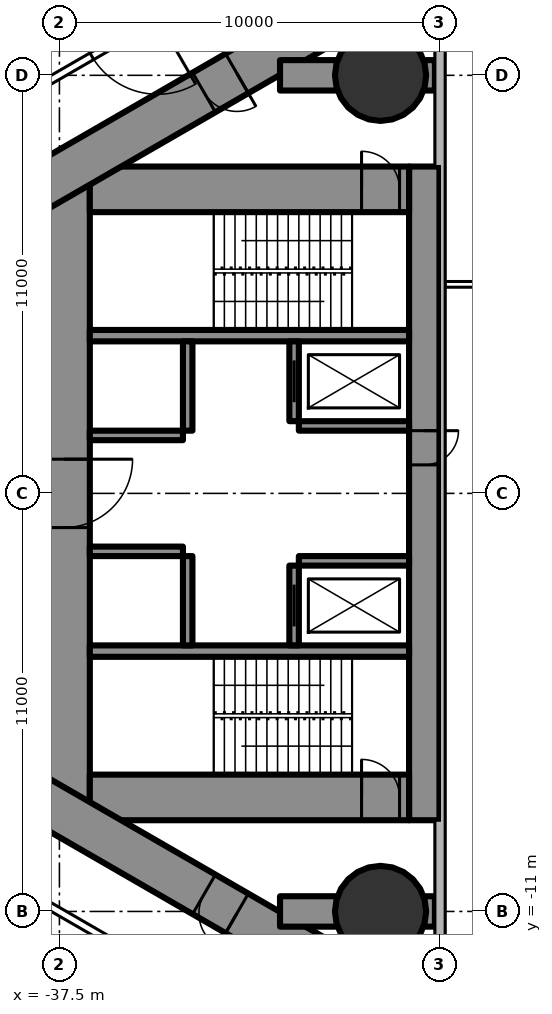
"""IFC4 building model, lengths in metres.
Left out: names, types, materials, properties, quantities, classifications, styles, units other than length and angle.
Written with IfcOpenShell. Run it as: python <this file> out.ifc"""

import sys

from ifc_helpers import new_model, si_unit, direction, frame, frame_2d, origin, origin_2d, place, context, subcontext, project, spatial, rectangle, hollow_circle, extrude, element, fill, save


model = new_model("IFC4")
c1 = context("Model", 3, precision=1e-05, world=origin(), true_north=direction((0.0, 1.0)))
c2 = subcontext(c1, "Body", "Model", "MODEL_VIEW")
j1 = project(units=[si_unit("LENGTHUNIT", "METRE"), si_unit("PLANEANGLEUNIT", "RADIAN")], contexts=[c1])
p1 = place(None, origin())
s1 = spatial("IfcSite", under=j1, at=p1, CompositionType="ELEMENT")
p2 = place(p1, origin())
s2 = spatial("IfcBuilding", under=s1, at=p2, CompositionType="ELEMENT")
p3 = place(p2, frame((0.0, 0.0, 210.3)))
s3 = spatial("IfcBuildingStorey", under=s2, at=p3, CompositionType="ELEMENT", Elevation=210.3)
for number, where, z_axis, x_axis in (
    (1, (-29.05, -11.0, 0.0), (0.0, 0.0, 1.0), (1.0, 0.0, 0.0)),
    (2, (-29.05, 11.0, 0.0), (0.0, 0.0, 1.0), (1.0, 0.0, 0.0)),
):
    element("IfcColumn", number, at=place(p3, frame(where, z_axis=z_axis, x_axis=x_axis)), inside=s3, PredefinedType="COLUMN", context=c2, shape_type="SweptSolid", body=[
        extrude(hollow_circle(Radius=1.2, WallThickness=0.09, at=origin_2d()), origin(), (0.0, 0.0, 1.0), 5.0),
    ])
p4 = place(p3, frame((-27.9, 8.6, 0.0), z_axis=(0.0, 0.0, 1.0), x_axis=(0.0, -1.0, 0.0)))
e3 = element("IfcWall", 3, at=p4, inside=s3, PredefinedType="SHEAR", context=c2, shape_type="SweptSolid", body=[
    extrude(rectangle(XDim=17.2, YDim=0.8, at=frame_2d((8.6, 0.0))), origin(), (0.0, 0.0, 1.0), 5.0),
])
p5 = place(p4, frame((6.95, 0.0, 0.0)))
e4 = element("IfcOpeningElement", 4, at=p5, cuts=e3, PredefinedType="OPENING", context=c2, shape_type="SweptSolid", body=[
    extrude(rectangle(XDim=0.9, YDim=2.2, at=frame_2d((0.45, 1.1))), frame((0.0, 0.41, 0.0), z_axis=(0.0, -1.0, 0.0), x_axis=(1.0, 0.0, 0.0)), (0.0, 0.0, 1.0), 0.82),
])
p6 = place(p3, frame((-37.375, 8.6, 0.0), z_axis=(0.0, 0.0, 1.0), x_axis=(0.0, -1.0, 0.0)))
e5 = element("IfcWall", 5, at=p6, inside=s3, PredefinedType="SHEAR", context=c2, shape_type="SweptSolid", body=[
    extrude(rectangle(XDim=17.2, YDim=1.35, at=frame_2d((8.6, 0.0))), origin(), (0.0, 0.0, 1.0), 5.0),
])
p7 = place(p6, frame((7.7, 0.0, 0.0)))
e6 = element("IfcOpeningElement", 6, at=p7, cuts=e5, PredefinedType="OPENING", context=c2, shape_type="SweptSolid", body=[
    extrude(rectangle(XDim=1.8, YDim=2.2, at=frame_2d((0.9, 1.1))), frame((0.0, 0.685, 0.0), z_axis=(0.0, -1.0, 0.0), x_axis=(1.0, 0.0, 0.0)), (0.0, 0.0, 1.0), 1.37),
])
p8 = place(p3, frame((-28.3, 8.0, 0.0), z_axis=(0.0, 0.0, 1.0), x_axis=(-1.0, 0.0, 0.0)))
e7 = element("IfcWall", 7, at=p8, inside=s3, PredefinedType="SHEAR", context=c2, shape_type="SweptSolid", body=[
    extrude(rectangle(XDim=8.4, YDim=1.2, at=frame_2d((4.2, 0.0))), origin(), (0.0, 0.0, 1.0), 5.0),
])
p9 = place(p8, frame((0.25, 0.0, 0.0)))
e8 = element("IfcOpeningElement", 8, at=p9, cuts=e7, PredefinedType="OPENING", context=c2, shape_type="SweptSolid", body=[
    extrude(rectangle(XDim=1.0, YDim=2.2, at=frame_2d((0.5, 1.1))), frame((0.0, 0.61, 0.0), z_axis=(0.0, -1.0, 0.0), x_axis=(1.0, 0.0, 0.0)), (0.0, 0.0, 1.0), 1.22),
])
p10 = place(p3, frame((-28.3, -8.0, 0.0), z_axis=(0.0, 0.0, 1.0), x_axis=(-1.0, 0.0, 0.0)))
e9 = element("IfcWall", 9, at=p10, inside=s3, PredefinedType="SHEAR", context=c2, shape_type="SweptSolid", body=[
    extrude(rectangle(XDim=8.4, YDim=1.2, at=frame_2d((4.2, 0.0))), origin(), (0.0, 0.0, 1.0), 5.0),
])
p11 = place(p10, frame((0.25, 0.0, 0.0)))
e10 = element("IfcOpeningElement", 10, at=p11, cuts=e9, PredefinedType="OPENING", context=c2, shape_type="SweptSolid", body=[
    extrude(rectangle(XDim=1.0, YDim=2.2, at=frame_2d((0.5, 1.1))), frame((0.0, 0.61, 0.0), z_axis=(0.0, -1.0, 0.0), x_axis=(1.0, 0.0, 0.0)), (0.0, 0.0, 1.0), 1.22),
])
for number, where, z_axis, x_axis in (
    (11, (-28.3, 4.15, 0.0), (0.0, 0.0, 1.0), (-1.0, 0.0, 0.0)),
    (12, (-28.3, -4.15, 0.0), (0.0, 0.0, 1.0), (-1.0, 0.0, 0.0)),
):
    element("IfcWall", number, at=place(p3, frame(where, z_axis=z_axis, x_axis=x_axis)), inside=s3, PredefinedType="SHEAR", context=c2, shape_type="SweptSolid", body=[
        extrude(rectangle(XDim=8.4, YDim=0.3, at=frame_2d((4.2, 0.0))), origin(), (0.0, 0.0, 1.0), 5.0),
    ])
p12 = place(p3, frame((-31.325, 4.0, 0.0), z_axis=(0.0, 0.0, 1.0), x_axis=(0.0, -1.0, 0.0)))
e13 = element("IfcWall", 13, at=p12, inside=s3, PredefinedType="SHEAR", context=c2, shape_type="SweptSolid", body=[
    extrude(rectangle(XDim=2.1, YDim=0.25, at=frame_2d((1.05, 0.0))), origin(), (0.0, 0.0, 1.0), 5.0),
])
p13 = place(p12, frame((0.5, 0.0, 0.0)))
e14 = element("IfcOpeningElement", 14, at=p13, cuts=e13, PredefinedType="OPENING", context=c2, shape_type="SweptSolid", body=[
    extrude(rectangle(XDim=1.1, YDim=2.2, at=frame_2d((0.55, 1.1))), frame((0.0, 0.135, 0.0), z_axis=(0.0, -1.0, 0.0), x_axis=(1.0, 0.0, 0.0)), (0.0, 0.0, 1.0), 0.27),
])
p14 = place(p3, frame((-34.125, 4.0, 0.0), z_axis=(0.0, 0.0, 1.0), x_axis=(0.0, -1.0, 0.0)))
e15 = element("IfcWall", 15, at=p14, inside=s3, PredefinedType="SHEAR", context=c2, shape_type="SweptSolid", body=[
    extrude(rectangle(XDim=2.35, YDim=0.25, at=frame_2d((1.175, 0.0))), origin(), (0.0, 0.0, 1.0), 5.0),
])
p15 = place(p3, frame((-28.3, 1.775, 0.0), z_axis=(0.0, 0.0, 1.0), x_axis=(-1.0, 0.0, 0.0)))
e16 = element("IfcWall", 16, at=p15, inside=s3, PredefinedType="SHEAR", context=c2, shape_type="SweptSolid", body=[
    extrude(rectangle(XDim=2.9, YDim=0.25, at=frame_2d((1.45, 0.0))), origin(), (0.0, 0.0, 1.0), 5.0),
])
p16 = place(p3, frame((-34.25, 1.525, 0.0), z_axis=(0.0, 0.0, 1.0), x_axis=(-1.0, 0.0, 0.0)))
e17 = element("IfcWall", 17, at=p16, inside=s3, PredefinedType="SHEAR", context=c2, shape_type="SweptSolid", body=[
    extrude(rectangle(XDim=2.45, YDim=0.25, at=frame_2d((1.225, 0.0))), origin(), (0.0, 0.0, 1.0), 5.0),
])
p17 = place(p3, frame((-31.325, -1.9, 0.0), z_axis=(0.0, 0.0, 1.0), x_axis=(0.0, -1.0, 0.0)))
e18 = element("IfcWall", 18, at=p17, inside=s3, PredefinedType="SHEAR", context=c2, shape_type="SweptSolid", body=[
    extrude(rectangle(XDim=2.1, YDim=0.25, at=frame_2d((1.05, 0.0))), origin(), (0.0, 0.0, 1.0), 5.0),
])
p18 = place(p17, frame((0.5, 0.0, 0.0)))
e19 = element("IfcOpeningElement", 19, at=p18, cuts=e18, PredefinedType="OPENING", context=c2, shape_type="SweptSolid", body=[
    extrude(rectangle(XDim=1.1, YDim=2.2, at=frame_2d((0.55, 1.1))), frame((0.0, 0.135, 0.0), z_axis=(0.0, -1.0, 0.0), x_axis=(1.0, 0.0, 0.0)), (0.0, 0.0, 1.0), 0.27),
])
p19 = place(p3, frame((-34.125, -1.65, 0.0), z_axis=(0.0, 0.0, 1.0), x_axis=(0.0, -1.0, 0.0)))
e20 = element("IfcWall", 20, at=p19, inside=s3, PredefinedType="SHEAR", context=c2, shape_type="SweptSolid", body=[
    extrude(rectangle(XDim=2.35, YDim=0.25, at=frame_2d((1.175, 0.0))), origin(), (0.0, 0.0, 1.0), 5.0),
])
p20 = place(p3, frame((-28.3, -1.775, 0.0), z_axis=(0.0, 0.0, 1.0), x_axis=(-1.0, 0.0, 0.0)))
e21 = element("IfcWall", 21, at=p20, inside=s3, PredefinedType="SHEAR", context=c2, shape_type="SweptSolid", body=[
    extrude(rectangle(XDim=2.9, YDim=0.25, at=frame_2d((1.45, 0.0))), origin(), (0.0, 0.0, 1.0), 5.0),
])
p21 = place(p3, frame((-34.25, -1.525, 0.0), z_axis=(0.0, 0.0, 1.0), x_axis=(-1.0, 0.0, 0.0)))
e22 = element("IfcWall", 22, at=p21, inside=s3, PredefinedType="SHEAR", context=c2, shape_type="SweptSolid", body=[
    extrude(rectangle(XDim=2.45, YDim=0.25, at=frame_2d((1.225, 0.0))), origin(), (0.0, 0.0, 1.0), 5.0),
])
p22 = place(p3, frame((-27.2, 14.3, 0.0), z_axis=(0.0, 0.0, 1.0), x_axis=(-0.866026593062, -0.499997940104, 0.0)))
e23 = element("IfcWall", 23, at=p22, inside=s3, PredefinedType="SHEAR", context=c2, shape_type="SweptSolid", body=[
    extrude(rectangle(XDim=28.946, YDim=1.2, at=frame_2d((14.473, 0.0))), origin(), (0.0, 0.0, 1.0), 5.0),
])
p23 = place(p22, frame((6.5, 0.0, 0.0)))
e24 = element("IfcOpeningElement", 24, at=p23, cuts=e23, PredefinedType="OPENING", context=c2, shape_type="SweptSolid", body=[
    extrude(rectangle(XDim=1.0, YDim=2.2, at=frame_2d((0.5, 1.1))), frame((0.0, 0.61, 0.0), z_axis=(0.0, -1.0, 0.0), x_axis=(1.0, 0.0, 0.0)), (0.0, 0.0, 1.0), 1.22),
])
p24 = place(p22, frame((13.568, 0.0, 0.0)))
e25 = element("IfcOpeningElement", 25, at=p24, cuts=e23, PredefinedType="OPENING", context=c2, shape_type="SweptSolid", body=[
    extrude(rectangle(XDim=1.8, YDim=2.2, at=frame_2d((0.9, 1.1))), frame((0.0, 0.61, 0.0), z_axis=(0.0, -1.0, 0.0), x_axis=(1.0, 0.0, 0.0)), (0.0, 0.0, 1.0), 1.22),
])
p25 = place(p3, frame((-27.2, -14.3, 0.0), z_axis=(0.0, 0.0, 1.0), x_axis=(-0.866024021859, 0.500002393557, 0.0)))
e26 = element("IfcWall", 26, at=p25, inside=s3, PredefinedType="SHEAR", context=c2, shape_type="SweptSolid", body=[
    extrude(rectangle(XDim=27.907, YDim=1.2, at=frame_2d((13.954, 0.0))), origin(), (0.0, 0.0, 1.0), 5.0),
])
p26 = place(p25, frame((6.5, 0.0, 0.0)))
e27 = element("IfcOpeningElement", 27, at=p26, cuts=e26, PredefinedType="OPENING", context=c2, shape_type="SweptSolid", body=[
    extrude(rectangle(XDim=1.0, YDim=2.2, at=frame_2d((0.5, 1.1))), frame((0.0, 0.61, 0.0), z_axis=(0.0, -1.0, 0.0), x_axis=(1.0, 0.0, 0.0)), (0.0, 0.0, 1.0), 1.22),
])
p27 = place(p25, frame((13.568, 0.0, 0.0)))
e28 = element("IfcOpeningElement", 28, at=p27, cuts=e26, PredefinedType="OPENING", context=c2, shape_type="SweptSolid", body=[
    extrude(rectangle(XDim=1.8, YDim=2.2, at=frame_2d((0.9, 1.1))), frame((0.0, 0.61, 0.0), z_axis=(0.0, -1.0, 0.0), x_axis=(1.0, 0.0, 0.0)), (0.0, 0.0, 1.0), 1.22),
])
for number, where, z_axis, x_axis in (
    (29, (-27.62, -11.0, 0.0), (0.0, 0.0, 1.0), (-1.0, 0.0, 0.0)),
    (30, (-27.62, 11.0, 0.0), (0.0, 0.0, 1.0), (-1.0, 0.0, 0.0)),
):
    element("IfcWall", number, at=place(p3, frame(where, z_axis=z_axis, x_axis=x_axis)), inside=s3, PredefinedType="SHEAR", context=c2, shape_type="SweptSolid", body=[
        extrude(rectangle(XDim=4.076, YDim=0.8, at=frame_2d((2.038, 0.0))), origin(), (0.0, 0.0, 1.0), 5.0),
    ])
p28 = place(p3, frame((-28.737, 16.068, 0.0), z_axis=(0.0, 0.0, 1.0), x_axis=(-0.866026057212, -0.499998868229, 0.0)))
e31 = element("IfcWall", 31, at=p28, inside=s3, PredefinedType="PARTITIONING", context=c2, shape_type="SweptSolid", body=[
    extrude(rectangle(XDim=32.137, YDim=0.2, at=frame_2d((16.068, 0.0))), origin(), (0.0, 0.0, 1.0), 4.75),
])
p29 = place(p28, frame((7.134, 0.0, 0.0)))
e32 = element("IfcOpeningElement", 32, at=p29, cuts=e31, PredefinedType="OPENING", context=c2, shape_type="SweptSolid", body=[
    extrude(rectangle(XDim=2.0, YDim=2.4, at=frame_2d((1.0, 1.2))), frame((0.0, 0.11, 0.0), z_axis=(0.0, -1.0, 0.0), x_axis=(1.0, 0.0, 0.0)), (0.0, 0.0, 1.0), 0.22),
])
p30 = place(p28, frame((16.776, 0.0, 0.0)))
e33 = element("IfcOpeningElement", 33, at=p30, cuts=e31, PredefinedType="OPENING", context=c2, shape_type="SweptSolid", body=[
    extrude(rectangle(XDim=1.8, YDim=2.2, at=frame_2d((0.9, 1.1))), frame((0.0, 0.11, 0.0), z_axis=(0.0, -1.0, 0.0), x_axis=(1.0, 0.0, 0.0)), (0.0, 0.0, 1.0), 0.22),
])
p31 = place(p28, frame((21.799, 0.0, 0.0)))
e34 = element("IfcOpeningElement", 34, at=p31, cuts=e31, PredefinedType="OPENING", context=c2, shape_type="SweptSolid", body=[
    extrude(rectangle(XDim=1.8, YDim=2.2, at=frame_2d((0.9, 1.1))), frame((0.0, 0.11, 0.0), z_axis=(0.0, -1.0, 0.0), x_axis=(1.0, 0.0, 0.0)), (0.0, 0.0, 1.0), 0.22),
])
p32 = place(p28, frame((26.575, 0.0, 0.0)))
e35 = element("IfcOpeningElement", 35, at=p32, cuts=e31, PredefinedType="OPENING", context=c2, shape_type="SweptSolid", body=[
    extrude(rectangle(XDim=1.8, YDim=2.2, at=frame_2d((0.9, 1.1))), frame((0.0, 0.11, 0.0), z_axis=(0.0, -1.0, 0.0), x_axis=(1.0, 0.0, 0.0)), (0.0, 0.0, 1.0), 0.22),
])
p33 = place(p3, frame((-28.737, -16.068, 0.0), z_axis=(0.0, 0.0, 1.0), x_axis=(-0.866029399323, 0.49999307946, 0.0)))
e36 = element("IfcWall", 36, at=p33, inside=s3, PredefinedType="PARTITIONING", context=c2, shape_type="SweptSolid", body=[
    extrude(rectangle(XDim=11.61, YDim=0.2, at=frame_2d((5.805, 0.0))), origin(), (0.0, 0.0, 1.0), 4.75),
])
p34 = place(p33, frame((4.905, 0.0, 0.0)))
e37 = element("IfcOpeningElement", 37, at=p34, cuts=e36, PredefinedType="OPENING", context=c2, shape_type="SweptSolid", body=[
    extrude(rectangle(XDim=1.8, YDim=2.2, at=frame_2d((0.9, 1.1))), frame((0.0, 0.11, 0.0), z_axis=(0.0, -1.0, 0.0), x_axis=(1.0, 0.0, 0.0)), (0.0, 0.0, 1.0), 0.22),
])
p35 = place(p3, frame((-27.35, 5.5, 0.0), z_axis=(0.0, 0.0, 1.0), x_axis=(1.0, 0.0, 0.0)))
e38 = element("IfcWall", 38, at=p35, inside=s3, PredefinedType="PARTITIONING", context=c2, shape_type="SweptSolid", body=[
    extrude(rectangle(XDim=0.85, YDim=0.15, at=frame_2d((0.425, 0.0))), origin(), (0.0, 0.0, 1.0), 3.8),
])
p36 = place(p29, origin())
e39 = element("IfcDoor", 39, at=p36, inside=s3, OperationType="DOUBLE_DOOR_SINGLE_SWING", PredefinedType="DOOR", context=c2, shape_type="SweptSolid", body=[
    extrude(rectangle(XDim=2.0, YDim=2.4, at=frame_2d((1.0, 1.2))), frame((0.0, 0.025, 0.0), z_axis=(0.0, -1.0, 0.0), x_axis=(1.0, 0.0, 0.0)), (0.0, 0.0, 1.0), 0.05),
])
fill(e32, e39)
p37 = place(p23, origin())
e40 = element("IfcDoor", 40, at=p37, inside=s3, OperationType="SINGLE_SWING_LEFT", PredefinedType="DOOR", context=c2, shape_type="SweptSolid", body=[
    extrude(rectangle(XDim=1.0, YDim=2.2, at=frame_2d((0.5, 1.1))), frame((0.0, 0.025, 0.0), z_axis=(0.0, -1.0, 0.0), x_axis=(1.0, 0.0, 0.0)), (0.0, 0.0, 1.0), 0.05),
])
fill(e24, e40)
p38 = place(p26, origin())
e41 = element("IfcDoor", 41, at=p38, inside=s3, OperationType="SINGLE_SWING_LEFT", PredefinedType="DOOR", context=c2, shape_type="SweptSolid", body=[
    extrude(rectangle(XDim=1.0, YDim=2.2, at=frame_2d((0.5, 1.1))), frame((0.0, 0.025, 0.0), z_axis=(0.0, -1.0, 0.0), x_axis=(1.0, 0.0, 0.0)), (0.0, 0.0, 1.0), 0.05),
])
fill(e27, e41)
p39 = place(p7, origin())
e42 = element("IfcDoor", 42, at=p39, inside=s3, OperationType="DOUBLE_DOOR_SINGLE_SWING", PredefinedType="DOOR", context=c2, shape_type="SweptSolid", body=[
    extrude(rectangle(XDim=1.8, YDim=2.2, at=frame_2d((0.9, 1.1))), frame((0.0, 0.025, 0.0), z_axis=(0.0, -1.0, 0.0), x_axis=(1.0, 0.0, 0.0)), (0.0, 0.0, 1.0), 0.05),
])
fill(e6, e42)
p40 = place(p9, origin())
e43 = element("IfcDoor", 43, at=p40, inside=s3, OperationType="SINGLE_SWING_RIGHT", PredefinedType="DOOR", context=c2, shape_type="SweptSolid", body=[
    extrude(rectangle(XDim=1.0, YDim=2.2, at=frame_2d((0.5, 1.1))), frame((0.0, 0.025, 0.0), z_axis=(0.0, -1.0, 0.0), x_axis=(1.0, 0.0, 0.0)), (0.0, 0.0, 1.0), 0.05),
])
fill(e8, e43)
p41 = place(p11, origin())
e44 = element("IfcDoor", 44, at=p41, inside=s3, OperationType="SINGLE_SWING_RIGHT", PredefinedType="DOOR", context=c2, shape_type="SweptSolid", body=[
    extrude(rectangle(XDim=1.0, YDim=2.2, at=frame_2d((0.5, 1.1))), frame((0.0, 0.025, 0.0), z_axis=(0.0, -1.0, 0.0), x_axis=(1.0, 0.0, 0.0)), (0.0, 0.0, 1.0), 0.05),
])
fill(e10, e44)
p42 = place(p5, origin())
e45 = element("IfcDoor", 45, at=p42, inside=s3, OperationType="SINGLE_SWING_LEFT", PredefinedType="DOOR", context=c2, shape_type="SweptSolid", body=[
    extrude(rectangle(XDim=0.9, YDim=2.2, at=frame_2d((0.45, 1.1))), frame((0.0, 0.025, 0.0), z_axis=(0.0, -1.0, 0.0), x_axis=(1.0, 0.0, 0.0)), (0.0, 0.0, 1.0), 0.05),
])
fill(e4, e45)
p43 = place(p13, origin())
e46 = element("IfcDoor", 46, at=p43, inside=s3, OperationType="SLIDING_TO_LEFT", PredefinedType="USERDEFINED", context=c2, shape_type="SweptSolid", body=[
    extrude(rectangle(XDim=1.1, YDim=2.2, at=frame_2d((0.55, 1.1))), frame((0.0, 0.025, 0.0), z_axis=(0.0, -1.0, 0.0), x_axis=(1.0, 0.0, 0.0)), (0.0, 0.0, 1.0), 0.05),
])
fill(e14, e46)
p44 = place(p18, origin())
e47 = element("IfcDoor", 47, at=p44, inside=s3, OperationType="SLIDING_TO_LEFT", PredefinedType="USERDEFINED", context=c2, shape_type="SweptSolid", body=[
    extrude(rectangle(XDim=1.1, YDim=2.2, at=frame_2d((0.55, 1.1))), frame((0.0, 0.025, 0.0), z_axis=(0.0, -1.0, 0.0), x_axis=(1.0, 0.0, 0.0)), (0.0, 0.0, 1.0), 0.05),
])
fill(e19, e47)
save(model, sys.argv[1])
